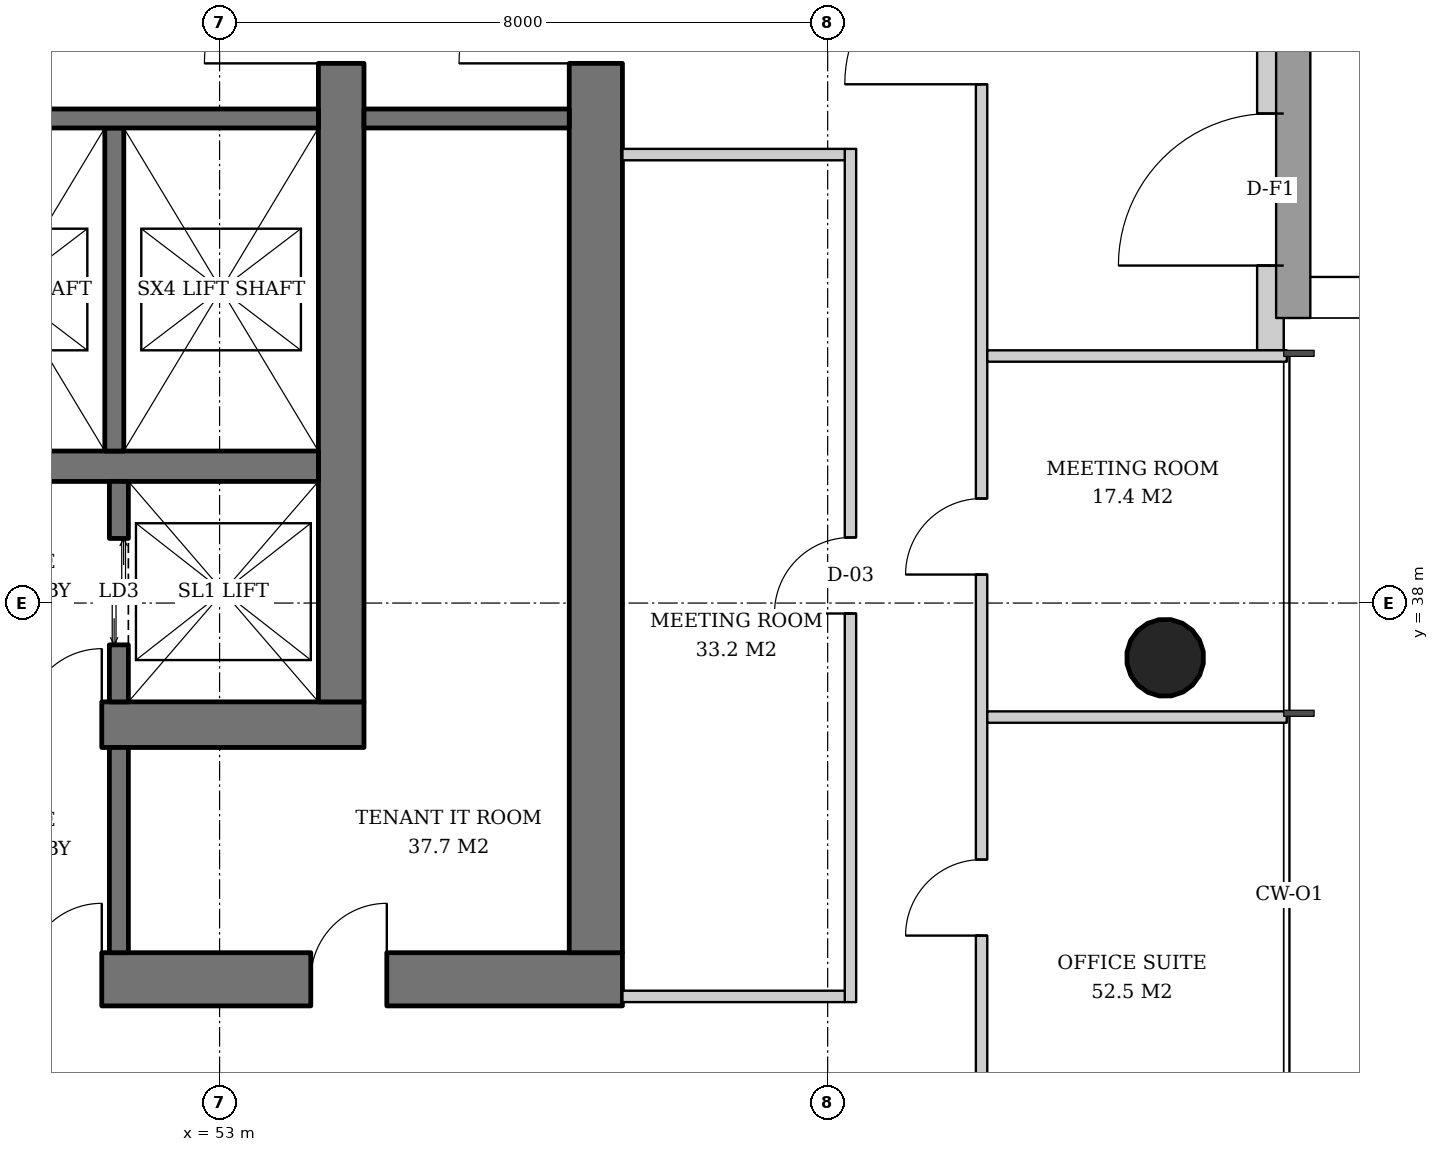
"""IFC4 building model, lengths in metres.
Left out: names, types, materials, properties, quantities, classifications, styles, units other than length and angle.
Written with IfcOpenShell. Run it as: python <this file> out.ifc"""

import sys

from ifc_helpers import new_model, si_unit, direction, frame, frame_2d, origin, origin_2d, place, context, subcontext, project, spatial, rectangle, hollow_circle, extrude, element, fill, save


model = new_model("IFC4")
c1 = context("Model", 3, precision=1e-05, world=origin(), true_north=direction((0.0, 1.0)))
c2 = subcontext(c1, "Body", "Model", "MODEL_VIEW")
j1 = project(units=[si_unit("LENGTHUNIT", "METRE"), si_unit("PLANEANGLEUNIT", "RADIAN")], contexts=[c1])
p1 = place(None, origin())
s1 = spatial("IfcSite", under=j1, at=p1, CompositionType="ELEMENT")
p2 = place(p1, origin())
s2 = spatial("IfcBuilding", under=s1, at=p2, CompositionType="ELEMENT")
p3 = place(p2, frame((0.0, 0.0, 131.2)))
s3 = spatial("IfcBuildingStorey", under=s2, at=p3, CompositionType="ELEMENT", Elevation=131.2)
p4 = place(p3, frame((65.479, 37.261, 0.0), z_axis=(-0.031910269556, 0.015987237665, 0.999362868496), x_axis=(-0.447933021895, -0.894067115991, 0.0)))
e1 = element("IfcColumn", 1, at=p4, inside=s3, PredefinedType="COLUMN", context=c2, shape_type="SweptSolid", body=[
    extrude(hollow_circle(Radius=0.508, WallThickness=0.04, at=origin_2d()), origin(), (0.0, 0.0, 1.0), 3.802),
])
p5 = place(p3, frame((35.1, 36.4, 0.0), z_axis=(0.0, 0.0, 1.0), x_axis=(1.0, 0.0, 0.0)))
e2 = element("IfcWall", 2, at=p5, inside=s3, PredefinedType="SHEAR", context=c2, shape_type="SweptSolid", body=[
    extrude(rectangle(XDim=19.8, YDim=0.6, at=frame_2d((9.9, 0.0))), origin(), (0.0, 0.0, 1.0), 3.8),
])
p6 = place(p5, frame((3.9, 0.0, 0.0)))
e3 = element("IfcOpeningElement", 3, at=p6, cuts=e2, PredefinedType="OPENING", context=c2, shape_type="SweptSolid", body=[
    extrude(rectangle(XDim=1.0, YDim=2.1, at=frame_2d((0.5, 1.05))), frame((0.0, 0.31, 0.0), z_axis=(0.0, -1.0, 0.0), x_axis=(1.0, 0.0, 0.0)), (0.0, 0.0, 1.0), 0.62),
])
p7 = place(p5, frame((15.35, 0.0, 0.0)))
e4 = element("IfcOpeningElement", 4, at=p7, cuts=e2, PredefinedType="OPENING", context=c2, shape_type="SweptSolid", body=[
    extrude(rectangle(XDim=1.0, YDim=2.1, at=frame_2d((0.5, 1.05))), frame((0.0, 0.31, 0.0), z_axis=(0.0, -1.0, 0.0), x_axis=(1.0, 0.0, 0.0)), (0.0, 0.0, 1.0), 0.62),
])
p8 = place(p3, frame((54.6, 36.7, 0.0), z_axis=(0.0, 0.0, 1.0), x_axis=(0.0, 1.0, 0.0)))
e5 = element("IfcWall", 5, at=p8, inside=s3, PredefinedType="SHEAR", context=c2, shape_type="SweptSolid", body=[
    extrude(rectangle(XDim=18.6, YDim=0.6, at=frame_2d((9.3, 0.0))), origin(), (0.0, 0.0, 1.0), 3.8),
])
p9 = place(p8, frame((8.4, 0.0, 0.0)))
e6 = element("IfcOpeningElement", 6, at=p9, cuts=e5, PredefinedType="OPENING", context=c2, shape_type="SweptSolid", body=[
    extrude(rectangle(XDim=1.8, YDim=2.4, at=frame_2d((0.9, 1.2))), frame((0.0, 0.31, 0.0), z_axis=(0.0, -1.0, 0.0), x_axis=(1.0, 0.0, 0.0)), (0.0, 0.0, 1.0), 0.62),
])
p10 = place(p3, frame((31.7, 33.05, 0.0), z_axis=(0.0, 0.0, 1.0), x_axis=(1.0, 0.0, 0.0)))
e7 = element("IfcWall", 7, at=p10, inside=s3, PredefinedType="SHEAR", context=c2, shape_type="SweptSolid", body=[
    extrude(rectangle(XDim=26.6, YDim=0.7, at=frame_2d((13.3, 0.0))), origin(), (0.0, 0.0, 1.0), 3.8),
])
p11 = place(p10, frame((7.3, 0.0, 0.0)))
e8 = element("IfcOpeningElement", 8, at=p11, cuts=e7, PredefinedType="OPENING", context=c2, shape_type="SweptSolid", body=[
    extrude(rectangle(XDim=1.0, YDim=2.1, at=frame_2d((0.5, 1.05))), frame((0.0, 0.36, 0.0), z_axis=(0.0, -1.0, 0.0), x_axis=(1.0, 0.0, 0.0)), (0.0, 0.0, 1.0), 0.72),
])
p12 = place(p10, frame((18.75, 0.0, 0.0)))
e9 = element("IfcOpeningElement", 9, at=p12, cuts=e7, PredefinedType="OPENING", context=c2, shape_type="SweptSolid", body=[
    extrude(rectangle(XDim=1.0, YDim=2.1, at=frame_2d((0.5, 1.05))), frame((0.0, 0.36, 0.0), z_axis=(0.0, -1.0, 0.0), x_axis=(1.0, 0.0, 0.0)), (0.0, 0.0, 1.0), 0.72),
])
p13 = place(p10, frame((3.2, 0.0, 0.0)))
e10 = element("IfcOpeningElement", 10, at=p13, cuts=e7, PredefinedType="OPENING", context=c2, shape_type="SweptSolid", body=[
    extrude(rectangle(XDim=1.0, YDim=2.1, at=frame_2d((0.5, 1.05))), frame((0.0, 0.36, 0.0), z_axis=(0.0, -1.0, 0.0), x_axis=(1.0, 0.0, 0.0)), (0.0, 0.0, 1.0), 0.72),
])
p14 = place(p10, frame((10.42, 0.0, 0.0)))
e11 = element("IfcOpeningElement", 11, at=p14, cuts=e7, PredefinedType="OPENING", context=c2, shape_type="SweptSolid", body=[
    extrude(rectangle(XDim=1.0, YDim=2.1, at=frame_2d((0.5, 1.05))), frame((0.0, 0.36, 0.0), z_axis=(0.0, -1.0, 0.0), x_axis=(1.0, 0.0, 0.0)), (0.0, 0.0, 1.0), 0.72),
])
p15 = place(p10, frame((14.46, 0.0, 0.0)))
e12 = element("IfcOpeningElement", 12, at=p15, cuts=e7, PredefinedType="OPENING", context=c2, shape_type="SweptSolid", body=[
    extrude(rectangle(XDim=1.0, YDim=2.1, at=frame_2d((0.5, 1.05))), frame((0.0, 0.36, 0.0), z_axis=(0.0, -1.0, 0.0), x_axis=(1.0, 0.0, 0.0)), (0.0, 0.0, 1.0), 0.72),
])
p16 = place(p10, frame((22.5, 0.0, 0.0)))
e13 = element("IfcOpeningElement", 13, at=p16, cuts=e7, PredefinedType="OPENING", context=c2, shape_type="SweptSolid", body=[
    extrude(rectangle(XDim=1.0, YDim=2.1, at=frame_2d((0.5, 1.05))), frame((0.0, 0.36, 0.0), z_axis=(0.0, -1.0, 0.0), x_axis=(1.0, 0.0, 0.0)), (0.0, 0.0, 1.0), 0.72),
])
p17 = place(p3, frame((57.95, 33.4, 0.0), z_axis=(0.0, 0.0, 1.0), x_axis=(0.0, 1.0, 0.0)))
e14 = element("IfcWall", 14, at=p17, inside=s3, PredefinedType="SHEAR", context=c2, shape_type="SweptSolid", body=[
    extrude(rectangle(XDim=25.2, YDim=0.7, at=frame_2d((12.6, 0.0))), origin(), (0.0, 0.0, 1.0), 3.8),
])
p18 = place(p17, frame((11.7, 0.0, 0.0)))
e15 = element("IfcOpeningElement", 15, at=p18, cuts=e14, PredefinedType="OPENING", context=c2, shape_type="SweptSolid", body=[
    extrude(rectangle(XDim=1.8, YDim=2.4, at=frame_2d((0.9, 1.2))), frame((0.0, 0.36, 0.0), z_axis=(0.0, -1.0, 0.0), x_axis=(1.0, 0.0, 0.0)), (0.0, 0.0, 1.0), 0.72),
])
p19 = place(p3, frame((35.7, 39.8, 0.0), z_axis=(0.0, 0.0, 1.0), x_axis=(1.0, 0.0, 0.0)))
e16 = element("IfcWall", 16, at=p19, inside=s3, PredefinedType="SHEAR", context=c2, shape_type="SweptSolid", body=[
    extrude(rectangle(XDim=18.6, YDim=0.4, at=frame_2d((9.3, 0.0))), origin(), (0.0, 0.0, 1.0), 3.8),
])
p20 = place(p3, frame((66.825, 41.325, 0.0), z_axis=(0.0, 0.0, 1.0), x_axis=(0.0, 1.0, 0.0)))
e17 = element("IfcWall", 17, at=p20, inside=s3, PredefinedType="SOLIDWALL", context=c2, shape_type="SweptSolid", body=[
    extrude(rectangle(XDim=9.175, YDim=0.35, at=frame_2d((4.587, 0.0))), origin(), (0.0, 0.0, 1.0), 3.62),
])
p21 = place(p20, frame((1.115, 0.0, 0.0)))
e18 = element("IfcOpeningElement", 18, at=p21, cuts=e17, PredefinedType="OPENING", context=c2, shape_type="SweptSolid", body=[
    extrude(rectangle(XDim=2.0, YDim=2.4, at=frame_2d((1.0, 1.2))), frame((0.0, 0.185, 0.0), z_axis=(0.0, -1.0, 0.0), x_axis=(1.0, 0.0, 0.0)), (0.0, 0.0, 1.0), 0.37),
])
p22 = place(p3, frame((51.675, 36.7, 0.0), z_axis=(0.0, 0.0, 1.0), x_axis=(0.0, 1.0, 0.0)))
e19 = element("IfcWall", 19, at=p22, inside=s3, PredefinedType="SHEAR", context=c2, shape_type="SweptSolid", body=[
    extrude(rectangle(XDim=2.9, YDim=0.25, at=frame_2d((1.45, 0.0))), origin(), (0.0, 0.0, 1.0), 3.8),
])
p23 = place(p22, frame((0.75, 0.0, 0.0)))
e20 = element("IfcOpeningElement", 20, at=p23, cuts=e19, PredefinedType="OPENING", context=c2, shape_type="SweptSolid", body=[
    extrude(rectangle(XDim=1.4, YDim=2.4, at=frame_2d((0.7, 1.2))), frame((0.0, 0.135, 0.0), z_axis=(0.0, -1.0, 0.0), x_axis=(1.0, 0.0, 0.0)), (0.0, 0.0, 1.0), 0.27),
])
p24 = place(p3, frame((51.615, 44.25, 0.0), z_axis=(0.0, 0.0, 1.0), x_axis=(0.0, -1.0, 0.0)))
e21 = element("IfcWall", 21, at=p24, inside=s3, PredefinedType="SHEAR", context=c2, shape_type="SweptSolid", body=[
    extrude(rectangle(XDim=4.25, YDim=0.25, at=frame_2d((2.125, 0.0))), origin(), (0.0, 0.0, 1.0), 3.8),
])
p25 = place(p3, frame((48.93, 44.375, 0.0), z_axis=(0.0, 0.0, 1.0), x_axis=(1.0, 0.0, 0.0)))
e22 = element("IfcWall", 22, at=p25, inside=s3, PredefinedType="SHEAR", context=c2, shape_type="SweptSolid", body=[
    extrude(rectangle(XDim=5.37, YDim=0.25, at=frame_2d((2.685, 0.0))), origin(), (0.0, 0.0, 1.0), 3.8),
])
for number, where, z_axis, x_axis in (
    (23, (54.9, 44.375, 0.0), (0.0, 0.0, 1.0), (1.0, 0.0, 0.0)),
    (24, (51.675, 33.4, 0.0), (0.0, 0.0, 1.0), (0.0, 1.0, 0.0)),
):
    element("IfcWall", number, at=place(p3, frame(where, z_axis=z_axis, x_axis=x_axis)), inside=s3, PredefinedType="SOLIDWALL", context=c2, shape_type="SweptSolid", body=[
        extrude(rectangle(XDim=2.7, YDim=0.25, at=frame_2d((1.35, 0.0))), origin(), (0.0, 0.0, 1.0), 3.62),
    ])
p26 = place(p3, frame((61.3, 32.75, 0.0), z_axis=(0.0, 0.0, 1.0), x_axis=(0.0, 1.0, 0.0)))
e25 = element("IfcWall", 25, at=p26, inside=s3, PredefinedType="PARTITIONING", context=c2, shape_type="SweptSolid", body=[
    extrude(rectangle(XDim=11.225, YDim=0.15, at=frame_2d((5.613, 0.0))), origin(), (0.0, 0.0, 1.0), 2.72),
])
p27 = place(p26, frame((5.113, 0.0, 0.0)))
e26 = element("IfcOpeningElement", 26, at=p27, cuts=e25, PredefinedType="OPENING", context=c2, shape_type="SweptSolid", body=[
    extrude(rectangle(XDim=1.0, YDim=2.1, at=frame_2d((0.5, 1.05))), frame((0.0, 0.085, 0.0), z_axis=(0.0, -1.0, 0.0), x_axis=(1.0, 0.0, 0.0)), (0.0, 0.0, 1.0), 0.17),
])
p28 = place(p3, frame((58.3, 32.825, 0.0), z_axis=(0.0, 0.0, 1.0), x_axis=(1.0, 0.0, 0.0)))
e27 = element("IfcWall", 27, at=p28, inside=s3, PredefinedType="PARTITIONING", context=c2, shape_type="SweptSolid", body=[
    extrude(rectangle(XDim=2.925, YDim=0.15, at=frame_2d((1.462, 0.0))), origin(), (0.0, 0.0, 1.0), 2.72),
])
p29 = place(p3, frame((58.3, 43.9, 0.0), z_axis=(0.0, 0.0, 1.0), x_axis=(1.0, 0.0, 0.0)))
e28 = element("IfcWall", 28, at=p29, inside=s3, PredefinedType="PARTITIONING", context=c2, shape_type="SweptSolid", body=[
    extrude(rectangle(XDim=2.925, YDim=0.15, at=frame_2d((1.462, 0.0))), origin(), (0.0, 0.0, 1.0), 3.62),
])
p30 = place(p3, frame((63.025, 29.888, 0.0), z_axis=(0.0, 0.0, 1.0), x_axis=(0.0, 1.0, 0.0)))
e29 = element("IfcWall", 29, at=p30, inside=s3, PredefinedType="PARTITIONING", context=c2, shape_type="SweptSolid", body=[
    extrude(rectangle(XDim=32.223, YDim=0.15, at=frame_2d((16.112, 0.0))), origin(), (0.0, 0.0, 1.0), 2.72),
])
p31 = place(p30, frame((3.737, 0.0, 0.0)))
e30 = element("IfcOpeningElement", 30, at=p31, cuts=e29, PredefinedType="OPENING", context=c2, shape_type="SweptSolid", body=[
    extrude(rectangle(XDim=1.0, YDim=2.1, at=frame_2d((0.5, 1.05))), frame((0.0, 0.085, 0.0), z_axis=(0.0, -1.0, 0.0), x_axis=(1.0, 0.0, 0.0)), (0.0, 0.0, 1.0), 0.17),
])
p32 = place(p30, frame((8.487, 0.0, 0.0)))
e31 = element("IfcOpeningElement", 31, at=p32, cuts=e29, PredefinedType="OPENING", context=c2, shape_type="SweptSolid", body=[
    extrude(rectangle(XDim=1.0, YDim=2.1, at=frame_2d((0.5, 1.05))), frame((0.0, 0.085, 0.0), z_axis=(0.0, -1.0, 0.0), x_axis=(1.0, 0.0, 0.0)), (0.0, 0.0, 1.0), 0.17),
])
p33 = place(p30, frame((14.937, 0.0, 0.0)))
e32 = element("IfcOpeningElement", 32, at=p33, cuts=e29, PredefinedType="OPENING", context=c2, shape_type="SweptSolid", body=[
    extrude(rectangle(XDim=1.8, YDim=2.4, at=frame_2d((0.9, 1.2))), frame((0.0, 0.085, 0.0), z_axis=(0.0, -1.0, 0.0), x_axis=(1.0, 0.0, 0.0)), (0.0, 0.0, 1.0), 0.17),
])
p34 = place(p30, frame((20.437, 0.0, 0.0)))
e33 = element("IfcOpeningElement", 33, at=p34, cuts=e29, PredefinedType="OPENING", context=c2, shape_type="SweptSolid", body=[
    extrude(rectangle(XDim=1.0, YDim=2.1, at=frame_2d((0.5, 1.05))), frame((0.0, 0.085, 0.0), z_axis=(0.0, -1.0, 0.0), x_axis=(1.0, 0.0, 0.0)), (0.0, 0.0, 1.0), 0.17),
])
p35 = place(p30, frame((27.487, 0.0, 0.0)))
e34 = element("IfcOpeningElement", 34, at=p35, cuts=e29, PredefinedType="OPENING", context=c2, shape_type="SweptSolid", body=[
    extrude(rectangle(XDim=1.0, YDim=2.1, at=frame_2d((0.5, 1.05))), frame((0.0, 0.085, 0.0), z_axis=(0.0, -1.0, 0.0), x_axis=(1.0, 0.0, 0.0)), (0.0, 0.0, 1.0), 0.17),
])
for number, where, z_axis, x_axis in (
    (35, (63.1, 36.5, 0.0), (0.0, 0.0, 1.0), (1.0, 0.0, 0.0)),
    (36, (63.1, 41.25, 0.0), (0.0, 0.0, 1.0), (1.0, 0.0, 0.0)),
):
    element("IfcWall", number, at=place(p3, frame(where, z_axis=z_axis, x_axis=x_axis)), inside=s3, PredefinedType="PARTITIONING", context=c2, shape_type="SweptSolid", body=[
        extrude(rectangle(XDim=3.94, YDim=0.15, at=frame_2d((1.97, 0.0))), origin(), (0.0, 0.0, 1.0), 2.82),
    ])
p36 = place(p21, origin())
e37 = element("IfcDoor", 37, at=p36, inside=s3, OperationType="DOUBLE_DOOR_SINGLE_SWING", PredefinedType="DOOR", context=c2, shape_type="SweptSolid", body=[
    extrude(rectangle(XDim=2.0, YDim=2.4, at=frame_2d((1.0, 1.2))), frame((0.0, 0.025, 0.0), z_axis=(0.0, -1.0, 0.0), x_axis=(1.0, 0.0, 0.0)), (0.0, 0.0, 1.0), 0.05),
])
fill(e18, e37)
p37 = place(p23, origin())
e38 = element("IfcDoor", 38, at=p37, inside=s3, OperationType="DOUBLE_DOOR_SLIDING", PredefinedType="DOOR", context=c2, shape_type="SweptSolid", body=[
    extrude(rectangle(XDim=1.4, YDim=2.4, at=frame_2d((0.7, 1.2))), frame((0.0, 0.025, 0.0), z_axis=(0.0, -1.0, 0.0), x_axis=(1.0, 0.0, 0.0)), (0.0, 0.0, 1.0), 0.05),
])
fill(e20, e38)
p38 = place(p9, origin())
e39 = element("IfcDoor", 39, at=p38, inside=s3, OperationType="DOUBLE_DOOR_SINGLE_SWING", PredefinedType="DOOR", context=c2, shape_type="SweptSolid", body=[
    extrude(rectangle(XDim=1.8, YDim=2.4, at=frame_2d((0.9, 1.2))), frame((0.0, 0.025, 0.0), z_axis=(0.0, -1.0, 0.0), x_axis=(1.0, 0.0, 0.0)), (0.0, 0.0, 1.0), 0.05),
])
fill(e6, e39)
p39 = place(p7, origin())
e40 = element("IfcDoor", 40, at=p39, inside=s3, OperationType="SINGLE_SWING_RIGHT", PredefinedType="DOOR", context=c2, shape_type="SweptSolid", body=[
    extrude(rectangle(XDim=1.0, YDim=2.1, at=frame_2d((0.5, 1.05))), frame((0.0, 0.025, 0.0), z_axis=(0.0, -1.0, 0.0), x_axis=(1.0, 0.0, 0.0)), (0.0, 0.0, 1.0), 0.05),
])
fill(e4, e40)
p40 = place(p18, origin())
e41 = element("IfcDoor", 41, at=p40, inside=s3, OperationType="DOUBLE_DOOR_SINGLE_SWING", PredefinedType="DOOR", context=c2, shape_type="SweptSolid", body=[
    extrude(rectangle(XDim=1.8, YDim=2.4, at=frame_2d((0.9, 1.2))), frame((0.0, 0.025, 0.0), z_axis=(0.0, -1.0, 0.0), x_axis=(1.0, 0.0, 0.0)), (0.0, 0.0, 1.0), 0.05),
])
fill(e15, e41)
p41 = place(p12, origin())
e42 = element("IfcDoor", 42, at=p41, inside=s3, OperationType="SINGLE_SWING_RIGHT", PredefinedType="DOOR", context=c2, shape_type="SweptSolid", body=[
    extrude(rectangle(XDim=1.0, YDim=2.1, at=frame_2d((0.5, 1.05))), frame((0.0, 0.025, 0.0), z_axis=(0.0, -1.0, 0.0), x_axis=(1.0, 0.0, 0.0)), (0.0, 0.0, 1.0), 0.05),
])
fill(e9, e42)
p42 = place(p16, origin())
e43 = element("IfcDoor", 43, at=p42, inside=s3, OperationType="SINGLE_SWING_RIGHT", PredefinedType="DOOR", context=c2, shape_type="SweptSolid", body=[
    extrude(rectangle(XDim=1.0, YDim=2.1, at=frame_2d((0.5, 1.05))), frame((0.0, 0.34, 0.0), z_axis=(0.0, -1.0, 0.0), x_axis=(1.0, 0.0, 0.0)), (0.0, 0.0, 1.0), 0.05),
])
fill(e13, e43)
p43 = place(p27, origin())
e44 = element("IfcDoor", 44, at=p43, inside=s3, OperationType="SINGLE_SWING_LEFT", PredefinedType="DOOR", context=c2, shape_type="SweptSolid", body=[
    extrude(rectangle(XDim=1.0, YDim=2.1, at=frame_2d((0.5, 1.05))), frame((0.0, 0.025, 0.0), z_axis=(0.0, -1.0, 0.0), x_axis=(1.0, 0.0, 0.0)), (0.0, 0.0, 1.0), 0.05),
])
fill(e26, e44)
p44 = place(p31, origin())
e45 = element("IfcDoor", 45, at=p44, inside=s3, OperationType="SINGLE_SWING_LEFT", PredefinedType="DOOR", context=c2, shape_type="SweptSolid", body=[
    extrude(rectangle(XDim=1.0, YDim=2.1, at=frame_2d((0.5, 1.05))), frame((0.0, 0.025, 0.0), z_axis=(0.0, -1.0, 0.0), x_axis=(1.0, 0.0, 0.0)), (0.0, 0.0, 1.0), 0.05),
])
fill(e30, e45)
p45 = place(p32, origin())
e46 = element("IfcDoor", 46, at=p45, inside=s3, OperationType="SINGLE_SWING_LEFT", PredefinedType="DOOR", context=c2, shape_type="SweptSolid", body=[
    extrude(rectangle(XDim=1.0, YDim=2.1, at=frame_2d((0.5, 1.05))), frame((0.0, 0.025, 0.0), z_axis=(0.0, -1.0, 0.0), x_axis=(1.0, 0.0, 0.0)), (0.0, 0.0, 1.0), 0.05),
])
fill(e31, e46)
p46 = place(p33, origin())
e47 = element("IfcDoor", 47, at=p46, inside=s3, OperationType="DOUBLE_DOOR_SINGLE_SWING", PredefinedType="DOOR", context=c2, shape_type="SweptSolid", body=[
    extrude(rectangle(XDim=1.8, YDim=2.4, at=frame_2d((0.9, 1.2))), frame((0.0, 0.025, 0.0), z_axis=(0.0, -1.0, 0.0), x_axis=(1.0, 0.0, 0.0)), (0.0, 0.0, 1.0), 0.05),
])
fill(e32, e47)
save(model, sys.argv[1])
